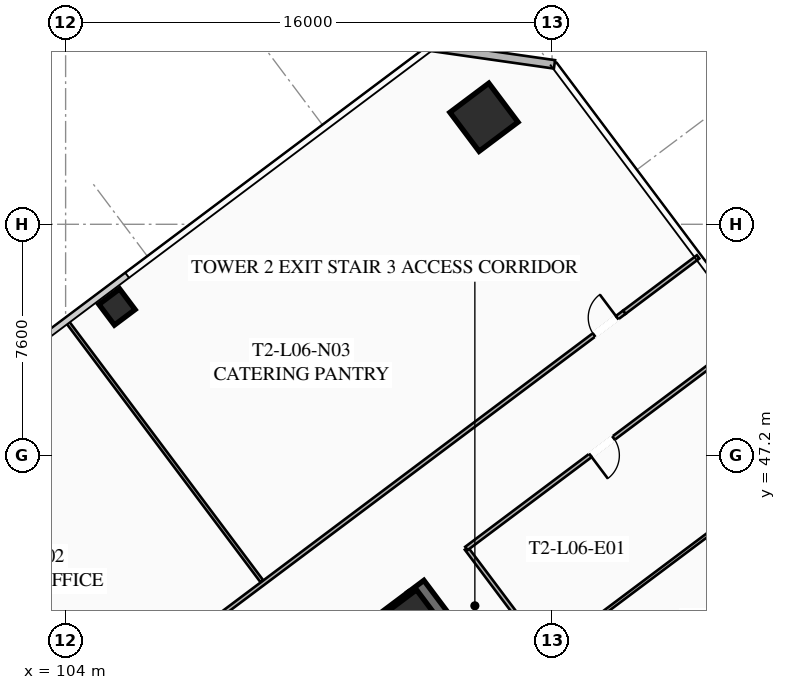
"""IFC4 building model, lengths in metres.
Left out: names, types, materials, properties, quantities, classifications, styles, units other than length and angle.
Written with IfcOpenShell. Run it as: python <this file> out.ifc"""

import sys

from ifc_helpers import new_model, si_unit, direction, frame, frame_2d, origin, origin_2d, place, context, subcontext, project, spatial, rectangle, hollow_rectangle, extrude, element, fill, save


model = new_model("IFC4")
c1 = context("Model", 3, precision=1e-05, world=origin(), true_north=direction((0.0, 1.0)))
c2 = subcontext(c1, "Body", "Model", "MODEL_VIEW")
j1 = project(units=[si_unit("LENGTHUNIT", "METRE"), si_unit("PLANEANGLEUNIT", "RADIAN")], contexts=[c1])
p1 = place(None, origin())
s1 = spatial("IfcSite", under=j1, at=p1, CompositionType="ELEMENT")
p2 = place(p1, origin())
s2 = spatial("IfcBuilding", under=s1, at=p2, CompositionType="ELEMENT")
p3 = place(p2, frame((0.0, 0.0, 28.15)))
s3 = spatial("IfcBuildingStorey", under=s2, at=p3, CompositionType="ELEMENT", Elevation=28.15)
p4 = place(p3, frame((115.524, 42.893, 0.0), z_axis=(0.0, 0.0, 1.0), x_axis=(0.600005007985, -0.799996243986, 0.0)))
e1 = element("IfcWall", 1, at=p4, inside=s3, PredefinedType="SHEAR", context=c2, shape_type="SweptSolid", body=[
    extrude(rectangle(XDim=15.6, YDim=0.65, at=frame_2d((7.8, 0.0))), origin(), (0.0, 0.0, 1.0), 3.55),
])
p5 = place(p3, frame((103.571, 33.522, 0.0), z_axis=(0.0, 0.0, 1.0), x_axis=(0.799998028465, 0.600002628705, 0.0)))
e2 = element("IfcWall", 2, at=p5, inside=s3, PredefinedType="SHEAR", context=c2, shape_type="SweptSolid", body=[
    extrude(rectangle(XDim=14.86, YDim=0.65, at=frame_2d((7.43, 0.0))), origin(), (0.0, 0.0, 1.0), 3.55),
])
p6 = place(p5, frame((4.48, 0.0, 0.0)))
e3 = element("IfcOpeningElement", 3, at=p6, cuts=e2, PredefinedType="OPENING", context=c2, shape_type="SweptSolid", body=[
    extrude(rectangle(XDim=1.25, YDim=2.25, at=frame_2d((0.625, 1.125))), frame((0.0, 0.335, 0.0), z_axis=(0.0, -1.0, 0.0), x_axis=(1.0, 0.0, 0.0)), (0.0, 0.0, 1.0), 0.67),
])
p7 = place(p5, frame((9.53, 0.0, 0.0)))
e4 = element("IfcOpeningElement", 4, at=p7, cuts=e2, PredefinedType="OPENING", context=c2, shape_type="SweptSolid", body=[
    extrude(rectangle(XDim=1.25, YDim=2.25, at=frame_2d((0.625, 1.125))), frame((0.0, 0.335, 0.0), z_axis=(0.0, -1.0, 0.0), x_axis=(1.0, 0.0, 0.0)), (0.0, 0.0, 1.0), 0.67),
])
p8 = place(p3, frame((115.41, 41.87, 0.0), z_axis=(0.0, 0.0, 1.0), x_axis=(0.799999996291, 0.600000004945, 0.0)))
e5 = element("IfcColumn", 5, at=p8, inside=s3, PredefinedType="COLUMN", context=c2, shape_type="SweptSolid", body=[
    extrude(hollow_rectangle(XDim=1.3, YDim=1.3, WallThickness=0.05, at=origin_2d()), origin(), (0.0, 0.0, 1.0), 3.35),
])
p9 = place(p3, frame((117.76, 58.32, 0.0), z_axis=(0.0, 0.0, 1.0), x_axis=(0.799999996291, 0.600000004945, 0.0)))
e6 = element("IfcColumn", 6, at=p9, inside=s3, PredefinedType="COLUMN", context=c2, shape_type="SweptSolid", body=[
    extrude(hollow_rectangle(XDim=1.6, YDim=1.6, WallThickness=0.06, at=origin_2d()), origin(), (0.0, 0.0, 1.0), 3.35),
])
p10 = place(p3, frame((105.69, 52.08, 0.0), z_axis=(0.0, 0.0, 1.0), x_axis=(0.799999996291, 0.600000004945, 0.0)))
e7 = element("IfcColumn", 7, at=p10, inside=s3, PredefinedType="COLUMN", context=c2, shape_type="SweptSolid", body=[
    extrude(hollow_rectangle(XDim=0.85, YDim=0.85, WallThickness=0.035, at=origin_2d()), origin(), (0.0, 0.0, 1.0), 3.35),
])
p11 = place(p3, frame((116.02, 60.64, 0.0), z_axis=(0.0, 0.0, 1.0), x_axis=(0.989955445613, -0.14137968631, 0.0)))
e8 = element("IfcWall", 8, at=p11, inside=s3, PredefinedType="SOLIDWALL", context=c2, shape_type="SweptSolid", body=[
    extrude(rectangle(XDim=4.101, YDim=0.28, at=frame_2d((2.051, 0.0))), origin(), (0.0, 0.0, 1.0), 3.35),
])
p12 = place(p3, frame((119.824, 40.618, 0.0), z_axis=(0.0, 0.0, 1.0), x_axis=(-0.599982243973, 0.800013316712, 0.0)))
e9 = element("IfcWall", 9, at=p12, inside=s3, PredefinedType="PARTITIONING", context=c2, shape_type="SweptSolid", body=[
    extrude(rectangle(XDim=4.4, YDim=0.135, at=frame_2d((2.2, 0.0))), origin(), (0.0, 0.0, 1.0), 2.703),
])
p13 = place(p3, frame((98.516, 34.012, 0.0), z_axis=(0.0, 0.0, 1.0), x_axis=(0.799998035726, 0.600002619023, 0.0)))
e10 = element("IfcWall", 10, at=p13, inside=s3, PredefinedType="PARTITIONING", context=c2, shape_type="SweptSolid", body=[
    extrude(rectangle(XDim=29.83, YDim=0.135, at=frame_2d((14.915, 0.0))), origin(), (0.0, 0.0, 1.0), 2.703),
])
p14 = place(p13, frame((0.3, 0.0, 0.0)))
e11 = element("IfcOpeningElement", 11, at=p14, cuts=e10, PredefinedType="OPENING", context=c2, shape_type="SweptSolid", body=[
    extrude(rectangle(XDim=0.95, YDim=2.05, at=frame_2d((0.475, 1.025))), frame((0.0, 0.077, 0.0), z_axis=(0.0, -1.0, 0.0), x_axis=(1.0, 0.0, 0.0)), (0.0, 0.0, 1.0), 0.155),
])
p15 = place(p13, frame((10.829, 0.0, 0.0)))
e12 = element("IfcOpeningElement", 12, at=p15, cuts=e10, PredefinedType="OPENING", context=c2, shape_type="SweptSolid", body=[
    extrude(rectangle(XDim=0.95, YDim=2.05, at=frame_2d((0.475, 1.025))), frame((0.0, 0.077, 0.0), z_axis=(0.0, -1.0, 0.0), x_axis=(1.0, 0.0, 0.0)), (0.0, 0.0, 1.0), 0.155),
])
p16 = place(p13, frame((28.58, 0.0, 0.0)))
e13 = element("IfcOpeningElement", 13, at=p16, cuts=e10, PredefinedType="OPENING", context=c2, shape_type="SweptSolid", body=[
    extrude(rectangle(XDim=0.95, YDim=2.05, at=frame_2d((0.475, 1.025))), frame((0.0, 0.077, 0.0), z_axis=(0.0, -1.0, 0.0), x_axis=(1.0, 0.0, 0.0)), (0.0, 0.0, 1.0), 0.155),
])
p17 = place(p3, frame((122.38, 51.91, 0.0), z_axis=(0.0, 0.0, 1.0), x_axis=(0.799990331366, 0.600012891296, 0.0)))
e14 = element("IfcWall", 14, at=p17, inside=s3, PredefinedType="PARTITIONING", context=c2, shape_type="SweptSolid", body=[
    extrude(rectangle(XDim=3.03, YDim=0.135, at=frame_2d((1.515, 0.0))), origin(), (0.0, 0.0, 1.0), 2.703),
])
p18 = place(p3, frame((110.452, 43.064, 0.0), z_axis=(0.0, 0.0, 1.0), x_axis=(-0.599992698573, 0.800005476018, 0.0)))
e15 = element("IfcWall", 15, at=p18, inside=s3, PredefinedType="PARTITIONING", context=c2, shape_type="SweptSolid", body=[
    extrude(rectangle(XDim=10.7, YDim=0.11, at=frame_2d((5.35, 0.0))), origin(), (0.0, 0.0, 1.0), 2.703),
])
p19 = place(p3, frame((126.664, 51.248, 0.0), z_axis=(0.0, 0.0, 1.0), x_axis=(-0.799995055373, -0.600006592779, 0.0)))
e16 = element("IfcWall", 16, at=p19, inside=s3, PredefinedType="PARTITIONING", context=c2, shape_type="SweptSolid", body=[
    extrude(rectangle(XDim=11.85, YDim=0.135, at=frame_2d((5.925, 0.0))), origin(), (0.0, 0.0, 1.0), 2.703),
])
p20 = place(p19, frame((5.8, 0.0, 0.0)))
e17 = element("IfcOpeningElement", 17, at=p20, cuts=e16, PredefinedType="OPENING", context=c2, shape_type="SweptSolid", body=[
    extrude(rectangle(XDim=0.95, YDim=2.05, at=frame_2d((0.475, 1.025))), frame((0.0, 0.077, 0.0), z_axis=(0.0, -1.0, 0.0), x_axis=(1.0, 0.0, 0.0)), (0.0, 0.0, 1.0), 0.155),
])
p21 = place(p3, frame((129.304, 47.728, 0.0), z_axis=(0.0, 0.0, 1.0), x_axis=(-0.8, -0.6, 0.0)))
e18 = element("IfcWall", 18, at=p21, inside=s3, PredefinedType="PARTITIONING", context=c2, shape_type="SweptSolid", body=[
    extrude(rectangle(XDim=10.0, YDim=0.11, at=frame_2d((5.0, 0.0))), origin(), (0.0, 0.0, 1.0), 2.703),
])
p22 = place(p16, origin())
e19 = element("IfcDoor", 19, at=p22, inside=s3, OperationType="SINGLE_SWING_RIGHT", PredefinedType="DOOR", context=c2, shape_type="SweptSolid", body=[
    extrude(rectangle(XDim=0.95, YDim=2.05, at=frame_2d((0.475, 1.025))), frame((0.0, 0.025, 0.0), z_axis=(0.0, -1.0, 0.0), x_axis=(1.0, 0.0, 0.0)), (0.0, 0.0, 1.0), 0.05),
])
fill(e13, e19)
p23 = place(p20, origin())
e20 = element("IfcDoor", 20, at=p23, inside=s3, OperationType="SINGLE_SWING_RIGHT", PredefinedType="DOOR", context=c2, shape_type="SweptSolid", body=[
    extrude(rectangle(XDim=0.95, YDim=2.05, at=frame_2d((0.475, 1.025))), frame((0.0, 0.025, 0.0), z_axis=(0.0, -1.0, 0.0), x_axis=(1.0, 0.0, 0.0)), (0.0, 0.0, 1.0), 0.05),
])
fill(e17, e20)
save(model, sys.argv[1])
